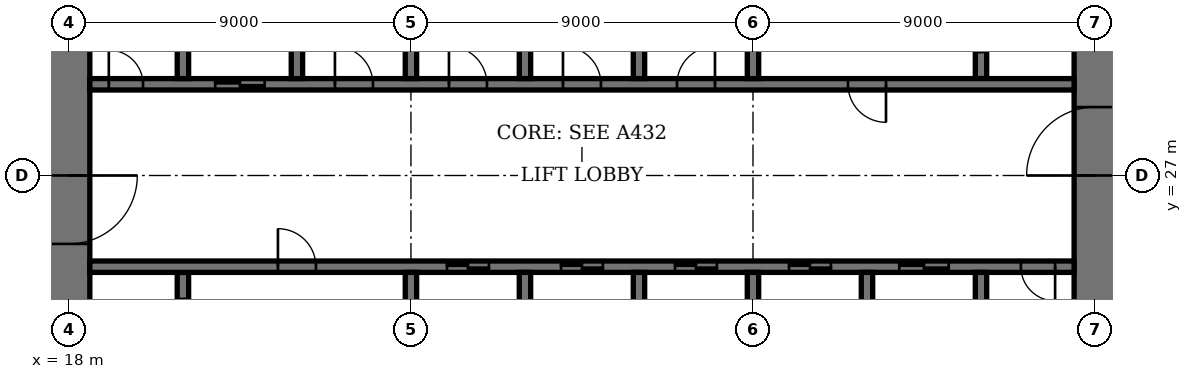
"""IFC4 building model, lengths in metres.
Left out: names, types, materials, properties, quantities, classifications, styles, units other than length and angle.
Written with IfcOpenShell. Run it as: python <this file> out.ifc"""

import sys

from ifc_helpers import new_model, si_unit, direction, frame, frame_2d, origin, place, context, subcontext, project, spatial, rectangle, extrude, element, fill, save


model = new_model("IFC4")
c1 = context("Model", 3, precision=1e-05, world=origin(), true_north=direction((0.0, 1.0)))
c2 = subcontext(c1, "Body", "Model", "MODEL_VIEW")
j1 = project(units=[si_unit("LENGTHUNIT", "METRE"), si_unit("PLANEANGLEUNIT", "RADIAN")], contexts=[c1])
p1 = place(None, origin())
s1 = spatial("IfcSite", under=j1, at=p1, CompositionType="ELEMENT")
p2 = place(p1, origin())
s2 = spatial("IfcBuilding", under=s1, at=p2, CompositionType="ELEMENT")
p3 = place(p2, frame((0.0, 0.0, 299.4)))
s3 = spatial("IfcBuildingStorey", under=s2, at=p3, CompositionType="ELEMENT", Elevation=299.4)
p4 = place(p3, frame((18.0, 35.45, 0.0), z_axis=(0.0, 0.0, 1.0), x_axis=(0.0, -1.0, 0.0)))
e1 = element("IfcWall", 1, at=p4, inside=s3, PredefinedType="SHEAR", context=c2, shape_type="SweptSolid", body=[
    extrude(rectangle(XDim=16.9, YDim=1.1, at=frame_2d((8.45, 0.0))), origin(), (0.0, 0.0, 1.0), 4.0),
])
p5 = place(p4, frame((8.45, 0.0, 0.0)))
e2 = element("IfcOpeningElement", 2, at=p5, cuts=e1, PredefinedType="OPENING", context=c2, shape_type="SweptSolid", body=[
    extrude(rectangle(XDim=1.8, YDim=2.4, at=frame_2d((0.9, 1.2))), frame((0.0, 0.56, 0.0), z_axis=(0.0, -1.0, 0.0), x_axis=(1.0, 0.0, 0.0)), (0.0, 0.0, 1.0), 1.12),
])
p6 = place(p3, frame((45.0, 18.55, 0.0), z_axis=(0.0, 0.0, 1.0), x_axis=(0.0, 1.0, 0.0)))
e3 = element("IfcWall", 3, at=p6, inside=s3, PredefinedType="SHEAR", context=c2, shape_type="SweptSolid", body=[
    extrude(rectangle(XDim=16.9, YDim=1.1, at=frame_2d((8.45, 0.0))), origin(), (0.0, 0.0, 1.0), 4.0),
])
p7 = place(p6, frame((8.45, 0.0, 0.0)))
e4 = element("IfcOpeningElement", 4, at=p7, cuts=e3, PredefinedType="OPENING", context=c2, shape_type="SweptSolid", body=[
    extrude(rectangle(XDim=1.8, YDim=2.4, at=frame_2d((0.9, 1.2))), frame((0.0, 0.56, 0.0), z_axis=(0.0, -1.0, 0.0), x_axis=(1.0, 0.0, 0.0)), (0.0, 0.0, 1.0), 1.12),
])
p8 = place(p3, frame((21.0, 21.95, 0.0), z_axis=(0.0, 0.0, 1.0), x_axis=(0.0, 1.0, 0.0)))
e5 = element("IfcWall", 5, at=p8, inside=s3, PredefinedType="SHEAR", context=c2, shape_type="SweptSolid", body=[
    extrude(rectangle(XDim=2.5, YDim=0.3, at=frame_2d((1.25, 0.0))), origin(), (0.0, 0.0, 1.0), 4.0),
])
p9 = place(p8, frame((0.7, 0.0, 0.0)))
e6 = element("IfcOpeningElement", 6, at=p9, cuts=e5, PredefinedType="OPENING", context=c2, shape_type="SweptSolid", body=[
    extrude(rectangle(XDim=1.1, YDim=2.4, at=frame_2d((0.55, 1.2))), frame((0.0, 0.16, 0.0), z_axis=(0.0, -1.0, 0.0), x_axis=(1.0, 0.0, 0.0)), (0.0, 0.0, 1.0), 0.32),
])
p10 = place(p3, frame((42.0, 29.55, 0.0), z_axis=(0.0, 0.0, 1.0), x_axis=(0.0, 1.0, 0.0)))
e7 = element("IfcWall", 7, at=p10, inside=s3, PredefinedType="SHEAR", context=c2, shape_type="SweptSolid", body=[
    extrude(rectangle(XDim=2.5, YDim=0.3, at=frame_2d((1.25, 0.0))), origin(), (0.0, 0.0, 1.0), 4.0),
])
p11 = place(p10, frame((0.7, 0.0, 0.0)))
e8 = element("IfcOpeningElement", 8, at=p11, cuts=e7, PredefinedType="OPENING", context=c2, shape_type="SweptSolid", body=[
    extrude(rectangle(XDim=1.1, YDim=2.4, at=frame_2d((0.55, 1.2))), frame((0.0, 0.16, 0.0), z_axis=(0.0, -1.0, 0.0), x_axis=(1.0, 0.0, 0.0)), (0.0, 0.0, 1.0), 0.32),
])
p12 = place(p3, frame((18.55, 24.6, 0.0), z_axis=(0.0, 0.0, 1.0), x_axis=(1.0, 0.0, 0.0)))
e9 = element("IfcWall", 9, at=p12, inside=s3, PredefinedType="SHEAR", context=c2, shape_type="SweptSolid", body=[
    extrude(rectangle(XDim=25.9, YDim=0.3, at=frame_2d((12.95, 0.0))), origin(), (0.0, 0.0, 1.0), 4.0),
])
p13 = place(p12, frame((4.95, 0.0, 0.0)))
e10 = element("IfcOpeningElement", 10, at=p13, cuts=e9, PredefinedType="OPENING", context=c2, shape_type="SweptSolid", body=[
    extrude(rectangle(XDim=1.0, YDim=2.4, at=frame_2d((0.5, 1.2))), frame((0.0, 0.16, 0.0), z_axis=(0.0, -1.0, 0.0), x_axis=(1.0, 0.0, 0.0)), (0.0, 0.0, 1.0), 0.32),
])
p14 = place(p12, frame((24.5, 0.0, 0.0)))
e11 = element("IfcOpeningElement", 11, at=p14, cuts=e9, PredefinedType="OPENING", context=c2, shape_type="SweptSolid", body=[
    extrude(rectangle(XDim=0.9, YDim=2.1, at=frame_2d((0.45, 1.05))), frame((0.0, 0.16, 0.0), z_axis=(0.0, -1.0, 0.0), x_axis=(1.0, 0.0, 0.0)), (0.0, 0.0, 1.0), 0.32),
])
p15 = place(p12, frame((9.4, 0.0, 0.0)))
e12 = element("IfcOpeningElement", 12, at=p15, cuts=e9, PredefinedType="OPENING", context=c2, shape_type="SweptSolid", body=[
    extrude(rectangle(XDim=1.1, YDim=2.4, at=frame_2d((0.55, 1.2))), frame((0.0, 0.16, 0.0), z_axis=(0.0, -1.0, 0.0), x_axis=(1.0, 0.0, 0.0)), (0.0, 0.0, 1.0), 0.32),
])
p16 = place(p12, frame((12.4, 0.0, 0.0)))
e13 = element("IfcOpeningElement", 13, at=p16, cuts=e9, PredefinedType="OPENING", context=c2, shape_type="SweptSolid", body=[
    extrude(rectangle(XDim=1.1, YDim=2.4, at=frame_2d((0.55, 1.2))), frame((0.0, 0.16, 0.0), z_axis=(0.0, -1.0, 0.0), x_axis=(1.0, 0.0, 0.0)), (0.0, 0.0, 1.0), 0.32),
])
p17 = place(p12, frame((15.4, 0.0, 0.0)))
e14 = element("IfcOpeningElement", 14, at=p17, cuts=e9, PredefinedType="OPENING", context=c2, shape_type="SweptSolid", body=[
    extrude(rectangle(XDim=1.1, YDim=2.4, at=frame_2d((0.55, 1.2))), frame((0.0, 0.16, 0.0), z_axis=(0.0, -1.0, 0.0), x_axis=(1.0, 0.0, 0.0)), (0.0, 0.0, 1.0), 0.32),
])
p18 = place(p12, frame((18.4, 0.0, 0.0)))
e15 = element("IfcOpeningElement", 15, at=p18, cuts=e9, PredefinedType="OPENING", context=c2, shape_type="SweptSolid", body=[
    extrude(rectangle(XDim=1.1, YDim=2.4, at=frame_2d((0.55, 1.2))), frame((0.0, 0.16, 0.0), z_axis=(0.0, -1.0, 0.0), x_axis=(1.0, 0.0, 0.0)), (0.0, 0.0, 1.0), 0.32),
])
p19 = place(p12, frame((21.3, 0.0, 0.0)))
e16 = element("IfcOpeningElement", 16, at=p19, cuts=e9, PredefinedType="OPENING", context=c2, shape_type="SweptSolid", body=[
    extrude(rectangle(XDim=1.3, YDim=2.4, at=frame_2d((0.65, 1.2))), frame((0.0, 0.16, 0.0), z_axis=(0.0, -1.0, 0.0), x_axis=(1.0, 0.0, 0.0)), (0.0, 0.0, 1.0), 0.32),
])
p20 = place(p3, frame((18.55, 29.4, 0.0), z_axis=(0.0, 0.0, 1.0), x_axis=(1.0, 0.0, 0.0)))
e17 = element("IfcWall", 17, at=p20, inside=s3, PredefinedType="SHEAR", context=c2, shape_type="SweptSolid", body=[
    extrude(rectangle(XDim=25.9, YDim=0.3, at=frame_2d((12.95, 0.0))), origin(), (0.0, 0.0, 1.0), 4.0),
])
p21 = place(p20, frame((19.95, 0.0, 0.0)))
e18 = element("IfcOpeningElement", 18, at=p21, cuts=e17, PredefinedType="OPENING", context=c2, shape_type="SweptSolid", body=[
    extrude(rectangle(XDim=1.0, YDim=2.4, at=frame_2d((0.5, 1.2))), frame((0.0, 0.16, 0.0), z_axis=(0.0, -1.0, 0.0), x_axis=(1.0, 0.0, 0.0)), (0.0, 0.0, 1.0), 0.32),
])
p22 = place(p20, frame((0.5, 0.0, 0.0)))
e19 = element("IfcOpeningElement", 19, at=p22, cuts=e17, PredefinedType="OPENING", context=c2, shape_type="SweptSolid", body=[
    extrude(rectangle(XDim=0.9, YDim=2.1, at=frame_2d((0.45, 1.05))), frame((0.0, 0.16, 0.0), z_axis=(0.0, -1.0, 0.0), x_axis=(1.0, 0.0, 0.0)), (0.0, 0.0, 1.0), 0.32),
])
p23 = place(p20, frame((15.45, 0.0, 0.0)))
e20 = element("IfcOpeningElement", 20, at=p23, cuts=e17, PredefinedType="OPENING", context=c2, shape_type="SweptSolid", body=[
    extrude(rectangle(XDim=1.0, YDim=2.4, at=frame_2d((0.5, 1.2))), frame((0.0, 0.16, 0.0), z_axis=(0.0, -1.0, 0.0), x_axis=(1.0, 0.0, 0.0)), (0.0, 0.0, 1.0), 0.32),
])
p24 = place(p20, frame((12.45, 0.0, 0.0)))
e21 = element("IfcOpeningElement", 21, at=p24, cuts=e17, PredefinedType="OPENING", context=c2, shape_type="SweptSolid", body=[
    extrude(rectangle(XDim=1.0, YDim=2.4, at=frame_2d((0.5, 1.2))), frame((0.0, 0.16, 0.0), z_axis=(0.0, -1.0, 0.0), x_axis=(1.0, 0.0, 0.0)), (0.0, 0.0, 1.0), 0.32),
])
p25 = place(p20, frame((9.45, 0.0, 0.0)))
e22 = element("IfcOpeningElement", 22, at=p25, cuts=e17, PredefinedType="OPENING", context=c2, shape_type="SweptSolid", body=[
    extrude(rectangle(XDim=1.0, YDim=2.4, at=frame_2d((0.5, 1.2))), frame((0.0, 0.16, 0.0), z_axis=(0.0, -1.0, 0.0), x_axis=(1.0, 0.0, 0.0)), (0.0, 0.0, 1.0), 0.32),
])
p26 = place(p20, frame((6.45, 0.0, 0.0)))
e23 = element("IfcOpeningElement", 23, at=p26, cuts=e17, PredefinedType="OPENING", context=c2, shape_type="SweptSolid", body=[
    extrude(rectangle(XDim=1.0, YDim=2.4, at=frame_2d((0.5, 1.2))), frame((0.0, 0.16, 0.0), z_axis=(0.0, -1.0, 0.0), x_axis=(1.0, 0.0, 0.0)), (0.0, 0.0, 1.0), 0.32),
])
p27 = place(p20, frame((3.3, 0.0, 0.0)))
e24 = element("IfcOpeningElement", 24, at=p27, cuts=e17, PredefinedType="OPENING", context=c2, shape_type="SweptSolid", body=[
    extrude(rectangle(XDim=1.3, YDim=2.4, at=frame_2d((0.65, 1.2))), frame((0.0, 0.16, 0.0), z_axis=(0.0, -1.0, 0.0), x_axis=(1.0, 0.0, 0.0)), (0.0, 0.0, 1.0), 0.32),
])
for number, where, z_axis, x_axis in (
    (25, (30.0, 21.75, 0.0), (0.0, 0.0, 1.0), (0.0, 1.0, 0.0)),
    (26, (33.0, 29.55, 0.0), (0.0, 0.0, 1.0), (0.0, 1.0, 0.0)),
    (27, (33.0, 21.75, 0.0), (0.0, 0.0, 1.0), (0.0, 1.0, 0.0)),
    (28, (30.0, 29.55, 0.0), (0.0, 0.0, 1.0), (0.0, 1.0, 0.0)),
    (29, (36.0, 21.75, 0.0), (0.0, 0.0, 1.0), (0.0, 1.0, 0.0)),
    (30, (27.0, 29.55, 0.0), (0.0, 0.0, 1.0), (0.0, 1.0, 0.0)),
):
    element("IfcWall", number, at=place(p3, frame(where, z_axis=z_axis, x_axis=x_axis)), inside=s3, PredefinedType="SHEAR", context=c2, shape_type="SweptSolid", body=[
        extrude(rectangle(XDim=2.7, YDim=0.3, at=frame_2d((1.35, 0.0))), origin(), (0.0, 0.0, 1.0), 4.0),
    ])
for number, where, z_axis, x_axis in (
    (31, (39.0, 18.55, 0.0), (0.0, 0.0, 1.0), (0.0, 1.0, 0.0)),
    (32, (24.0, 29.55, 0.0), (0.0, 0.0, 1.0), (0.0, 1.0, 0.0)),
):
    element("IfcWall", number, at=place(p3, frame(where, z_axis=z_axis, x_axis=x_axis)), inside=s3, PredefinedType="SHEAR", context=c2, shape_type="SweptSolid", body=[
        extrude(rectangle(XDim=5.9, YDim=0.3, at=frame_2d((2.95, 0.0))), origin(), (0.0, 0.0, 1.0), 4.0),
    ])
for number, where, z_axis, x_axis in (
    (33, (42.0, 21.75, 0.0), (0.0, 0.0, 1.0), (0.0, 1.0, 0.0)),
    (34, (21.0, 29.55, 0.0), (0.0, 0.0, 1.0), (0.0, 1.0, 0.0)),
):
    element("IfcWall", number, at=place(p3, frame(where, z_axis=z_axis, x_axis=x_axis)), inside=s3, PredefinedType="SHEAR", context=c2, shape_type="SweptSolid", body=[
        extrude(rectangle(XDim=2.7, YDim=0.3, at=frame_2d((1.35, 0.0))), origin(), (0.0, 0.0, 1.0), 4.0),
    ])
for number, where, z_axis, x_axis in (
    (35, (27.0, 21.6, 0.0), (0.0, 0.0, 1.0), (0.0, 1.0, 0.0)),
    (36, (36.0, 29.55, 0.0), (0.0, 0.0, 1.0), (0.0, 1.0, 0.0)),
):
    element("IfcWall", number, at=place(p3, frame(where, z_axis=z_axis, x_axis=x_axis)), inside=s3, PredefinedType="SHEAR", context=c2, shape_type="SweptSolid", body=[
        extrude(rectangle(XDim=2.85, YDim=0.3, at=frame_2d((1.425, 0.0))), origin(), (0.0, 0.0, 1.0), 4.0),
    ])
p28 = place(p5, origin())
e37 = element("IfcDoor", 37, at=p28, inside=s3, OperationType="DOUBLE_DOOR_DOUBLE_SWING", PredefinedType="DOOR", context=c2, shape_type="SweptSolid", body=[
    extrude(rectangle(XDim=1.8, YDim=2.4, at=frame_2d((0.9, 1.2))), frame((0.0, 0.03, 0.0), z_axis=(0.0, -1.0, 0.0), x_axis=(1.0, 0.0, 0.0)), (0.0, 0.0, 1.0), 0.06),
    extrude(rectangle(XDim=0.04, YDim=2.4, at=frame_2d((0.02, 1.2))), frame((0.0, 0.55, 0.0), z_axis=(0.0, -1.0, 0.0), x_axis=(1.0, 0.0, 0.0)), (0.0, 0.0, 1.0), 1.1),
    extrude(rectangle(XDim=0.04, YDim=2.4, at=frame_2d((1.78, 1.2))), frame((0.0, 0.55, 0.0), z_axis=(0.0, -1.0, 0.0), x_axis=(1.0, 0.0, 0.0)), (0.0, 0.0, 1.0), 1.1),
    extrude(rectangle(XDim=1.8, YDim=0.04, at=frame_2d((0.9, 2.38))), frame((0.0, 0.55, 0.0), z_axis=(0.0, -1.0, 0.0), x_axis=(1.0, 0.0, 0.0)), (0.0, 0.0, 1.0), 1.1),
])
fill(e2, e37)
p29 = place(p7, origin())
e38 = element("IfcDoor", 38, at=p29, inside=s3, OperationType="DOUBLE_DOOR_DOUBLE_SWING", PredefinedType="DOOR", context=c2, shape_type="SweptSolid", body=[
    extrude(rectangle(XDim=1.8, YDim=2.4, at=frame_2d((0.9, 1.2))), frame((0.0, 0.03, 0.0), z_axis=(0.0, -1.0, 0.0), x_axis=(1.0, 0.0, 0.0)), (0.0, 0.0, 1.0), 0.06),
    extrude(rectangle(XDim=0.04, YDim=2.4, at=frame_2d((0.02, 1.2))), frame((0.0, 0.55, 0.0), z_axis=(0.0, -1.0, 0.0), x_axis=(1.0, 0.0, 0.0)), (0.0, 0.0, 1.0), 1.1),
    extrude(rectangle(XDim=0.04, YDim=2.4, at=frame_2d((1.78, 1.2))), frame((0.0, 0.55, 0.0), z_axis=(0.0, -1.0, 0.0), x_axis=(1.0, 0.0, 0.0)), (0.0, 0.0, 1.0), 1.1),
    extrude(rectangle(XDim=1.8, YDim=0.04, at=frame_2d((0.9, 2.38))), frame((0.0, 0.55, 0.0), z_axis=(0.0, -1.0, 0.0), x_axis=(1.0, 0.0, 0.0)), (0.0, 0.0, 1.0), 1.1),
])
fill(e4, e38)
p30 = place(p13, origin())
e39 = element("IfcDoor", 39, at=p30, inside=s3, OperationType="SINGLE_SWING_RIGHT", PredefinedType="DOOR", context=c2, shape_type="SweptSolid", body=[
    extrude(rectangle(XDim=1.0, YDim=2.4, at=frame_2d((0.5, 1.2))), frame((0.0, 0.03, 0.0), z_axis=(0.0, -1.0, 0.0), x_axis=(1.0, 0.0, 0.0)), (0.0, 0.0, 1.0), 0.06),
])
fill(e10, e39)
p31 = place(p21, origin())
e40 = element("IfcDoor", 40, at=p31, inside=s3, OperationType="SINGLE_SWING_RIGHT", PredefinedType="DOOR", context=c2, shape_type="SweptSolid", body=[
    extrude(rectangle(XDim=1.0, YDim=2.4, at=frame_2d((0.5, 1.2))), frame((0.0, 0.03, 0.0), z_axis=(0.0, -1.0, 0.0), x_axis=(1.0, 0.0, 0.0)), (0.0, 0.0, 1.0), 0.06),
])
fill(e18, e40)
p32 = place(p14, origin())
e41 = element("IfcDoor", 41, at=p32, inside=s3, OperationType="SINGLE_SWING_RIGHT", PredefinedType="DOOR", context=c2, shape_type="SweptSolid", body=[
    extrude(rectangle(XDim=0.9, YDim=2.1, at=frame_2d((0.45, 1.05))), frame((0.0, 0.03, 0.0), z_axis=(0.0, -1.0, 0.0), x_axis=(1.0, 0.0, 0.0)), (0.0, 0.0, 1.0), 0.06),
])
fill(e11, e41)
p33 = place(p22, origin())
e42 = element("IfcDoor", 42, at=p33, inside=s3, OperationType="SINGLE_SWING_RIGHT", PredefinedType="DOOR", context=c2, shape_type="SweptSolid", body=[
    extrude(rectangle(XDim=0.9, YDim=2.1, at=frame_2d((0.45, 1.05))), frame((0.0, 0.03, 0.0), z_axis=(0.0, -1.0, 0.0), x_axis=(1.0, 0.0, 0.0)), (0.0, 0.0, 1.0), 0.06),
])
fill(e19, e42)
p34 = place(p15, origin())
e43 = element("IfcDoor", 43, at=p34, inside=s3, OperationType="DOUBLE_DOOR_SLIDING", PredefinedType="DOOR", context=c2, shape_type="SweptSolid", body=[
    extrude(rectangle(XDim=1.1, YDim=2.4, at=frame_2d((0.55, 1.2))), frame((0.0, 0.02, 0.0), z_axis=(0.0, -1.0, 0.0), x_axis=(1.0, 0.0, 0.0)), (0.0, 0.0, 1.0), 0.04),
])
fill(e12, e43)
p35 = place(p16, origin())
e44 = element("IfcDoor", 44, at=p35, inside=s3, OperationType="DOUBLE_DOOR_SLIDING", PredefinedType="DOOR", context=c2, shape_type="SweptSolid", body=[
    extrude(rectangle(XDim=1.1, YDim=2.4, at=frame_2d((0.55, 1.2))), frame((0.0, 0.02, 0.0), z_axis=(0.0, -1.0, 0.0), x_axis=(1.0, 0.0, 0.0)), (0.0, 0.0, 1.0), 0.04),
])
fill(e13, e44)
p36 = place(p17, origin())
e45 = element("IfcDoor", 45, at=p36, inside=s3, OperationType="DOUBLE_DOOR_SLIDING", PredefinedType="DOOR", context=c2, shape_type="SweptSolid", body=[
    extrude(rectangle(XDim=1.1, YDim=2.4, at=frame_2d((0.55, 1.2))), frame((0.0, 0.02, 0.0), z_axis=(0.0, -1.0, 0.0), x_axis=(1.0, 0.0, 0.0)), (0.0, 0.0, 1.0), 0.04),
])
fill(e14, e45)
p37 = place(p18, origin())
e46 = element("IfcDoor", 46, at=p37, inside=s3, OperationType="DOUBLE_DOOR_SLIDING", PredefinedType="DOOR", context=c2, shape_type="SweptSolid", body=[
    extrude(rectangle(XDim=1.1, YDim=2.4, at=frame_2d((0.55, 1.2))), frame((0.0, 0.02, 0.0), z_axis=(0.0, -1.0, 0.0), x_axis=(1.0, 0.0, 0.0)), (0.0, 0.0, 1.0), 0.04),
])
fill(e15, e46)
p38 = place(p23, origin())
e47 = element("IfcDoor", 47, at=p38, inside=s3, OperationType="SINGLE_SWING_LEFT", PredefinedType="DOOR", context=c2, shape_type="SweptSolid", body=[
    extrude(rectangle(XDim=1.0, YDim=2.4, at=frame_2d((0.5, 1.2))), frame((0.0, 0.03, 0.0), z_axis=(0.0, -1.0, 0.0), x_axis=(1.0, 0.0, 0.0)), (0.0, 0.0, 1.0), 0.06),
])
fill(e20, e47)
p39 = place(p24, origin())
e48 = element("IfcDoor", 48, at=p39, inside=s3, OperationType="SINGLE_SWING_RIGHT", PredefinedType="DOOR", context=c2, shape_type="SweptSolid", body=[
    extrude(rectangle(XDim=1.0, YDim=2.4, at=frame_2d((0.5, 1.2))), frame((0.0, 0.03, 0.0), z_axis=(0.0, -1.0, 0.0), x_axis=(1.0, 0.0, 0.0)), (0.0, 0.0, 1.0), 0.06),
])
fill(e21, e48)
p40 = place(p25, origin())
e49 = element("IfcDoor", 49, at=p40, inside=s3, OperationType="SINGLE_SWING_RIGHT", PredefinedType="DOOR", context=c2, shape_type="SweptSolid", body=[
    extrude(rectangle(XDim=1.0, YDim=2.4, at=frame_2d((0.5, 1.2))), frame((0.0, 0.03, 0.0), z_axis=(0.0, -1.0, 0.0), x_axis=(1.0, 0.0, 0.0)), (0.0, 0.0, 1.0), 0.06),
])
fill(e22, e49)
p41 = place(p26, origin())
e50 = element("IfcDoor", 50, at=p41, inside=s3, OperationType="SINGLE_SWING_RIGHT", PredefinedType="DOOR", context=c2, shape_type="SweptSolid", body=[
    extrude(rectangle(XDim=1.0, YDim=2.4, at=frame_2d((0.5, 1.2))), frame((0.0, 0.03, 0.0), z_axis=(0.0, -1.0, 0.0), x_axis=(1.0, 0.0, 0.0)), (0.0, 0.0, 1.0), 0.06),
])
fill(e23, e50)
p42 = place(p19, origin())
e51 = element("IfcDoor", 51, at=p42, inside=s3, OperationType="DOUBLE_DOOR_SLIDING", PredefinedType="DOOR", context=c2, shape_type="SweptSolid", body=[
    extrude(rectangle(XDim=1.3, YDim=2.4, at=frame_2d((0.65, 1.2))), frame((0.0, 0.02, 0.0), z_axis=(0.0, -1.0, 0.0), x_axis=(1.0, 0.0, 0.0)), (0.0, 0.0, 1.0), 0.04),
])
fill(e16, e51)
p43 = place(p27, origin())
e52 = element("IfcDoor", 52, at=p43, inside=s3, OperationType="DOUBLE_DOOR_SLIDING", PredefinedType="DOOR", context=c2, shape_type="SweptSolid", body=[
    extrude(rectangle(XDim=1.3, YDim=2.4, at=frame_2d((0.65, 1.2))), frame((0.0, 0.02, 0.0), z_axis=(0.0, -1.0, 0.0), x_axis=(1.0, 0.0, 0.0)), (0.0, 0.0, 1.0), 0.04),
])
fill(e24, e52)
save(model, sys.argv[1])
